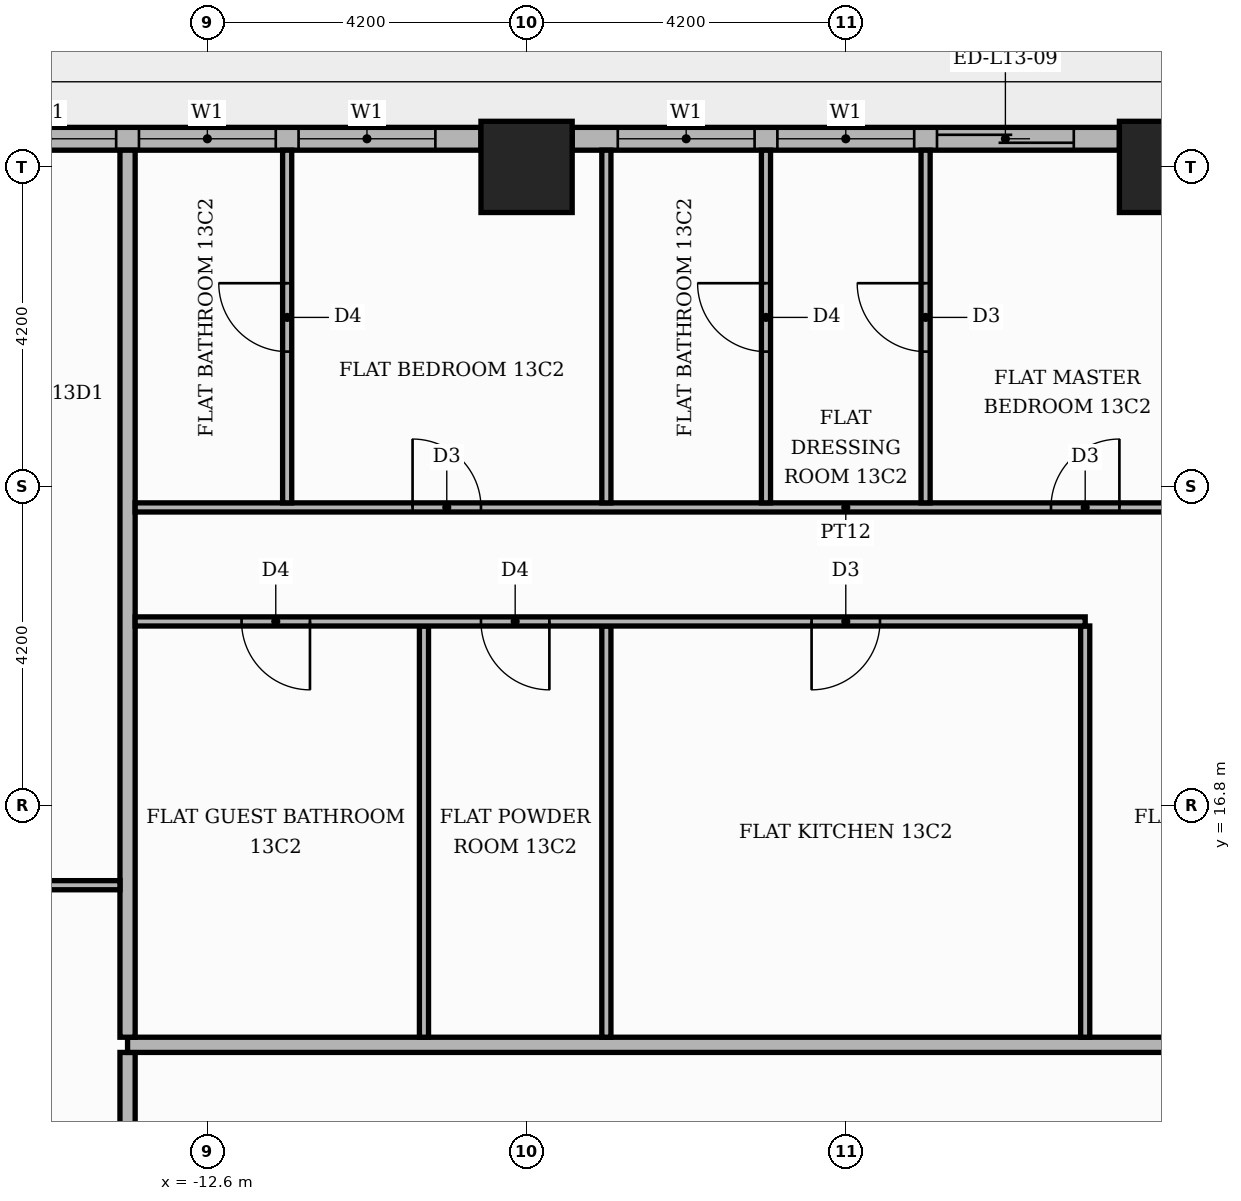
"""IFC4 building model, lengths in metres.
Left out: names, types, materials, properties, quantities, classifications, styles, units other than length and angle.
Written with IfcOpenShell. Run it as: python <this file> out.ifc"""

import sys

from ifc_helpers import new_model, si_unit, direction, frame, frame_2d, origin, origin_2d, place, context, subcontext, project, spatial, rectangle, extrude, element, fill, save


model = new_model("IFC4")
c1 = context("Model", 3, precision=1e-05, world=origin(), true_north=direction((0.0, 1.0)))
c2 = subcontext(c1, "Body", "Model", "MODEL_VIEW")
j1 = project(units=[si_unit("LENGTHUNIT", "METRE"), si_unit("PLANEANGLEUNIT", "RADIAN")], contexts=[c1])
p1 = place(None, origin())
s1 = spatial("IfcSite", under=j1, at=p1, CompositionType="ELEMENT")
p2 = place(p1, origin())
s2 = spatial("IfcBuilding", under=s1, at=p2, CompositionType="ELEMENT")
p3 = place(p2, frame((0.0, 0.0, 58.2)))
s3 = spatial("IfcBuildingStorey", under=s2, at=p3, CompositionType="ELEMENT", Elevation=58.2)
for number, where, z_axis, x_axis in (
    (1, (0.0, 25.2, 0.0), (0.0, 0.0, 1.0), (1.0, 0.0, 0.0)),
    (2, (-8.4, 25.2, 0.0), (0.0, 0.0, 1.0), (1.0, 0.0, 0.0)),
):
    element("IfcColumn", number, at=place(p3, frame(where, z_axis=z_axis, x_axis=x_axis)), inside=s3, PredefinedType="COLUMN", context=c2, shape_type="SweptSolid", body=[
        extrude(rectangle(XDim=1.2, YDim=1.2, at=origin_2d()), origin(), (0.0, 0.0, 1.0), 3.9),
    ])
p4 = place(p3, frame((-0.6, 25.57, 0.0), z_axis=(0.0, 0.0, 1.0), x_axis=(-1.0, 0.0, 0.0)))
e3 = element("IfcWall", 3, at=p4, inside=s3, PredefinedType="STANDARD", context=c2, shape_type="SweptSolid", body=[
    extrude(rectangle(XDim=7.2, YDim=0.3, at=frame_2d((3.6, 0.0))), origin(), (0.0, 0.0, 1.0), 3.48),
])
p5 = place(p4, frame((0.6, 0.0, 0.0)))
e4 = element("IfcOpeningElement", 4, at=p5, cuts=e3, PredefinedType="OPENING", context=c2, shape_type="SweptSolid", body=[
    extrude(rectangle(XDim=1.8, YDim=2.4, at=frame_2d((0.9, 1.2))), frame((0.0, 0.16, 0.0), z_axis=(0.0, -1.0, 0.0), x_axis=(1.0, 0.0, 0.0)), (0.0, 0.0, 1.0), 0.32),
])
p6 = place(p4, frame((2.7, 0.0, 0.9)))
e5 = element("IfcOpeningElement", 5, at=p6, cuts=e3, PredefinedType="OPENING", context=c2, shape_type="SweptSolid", body=[
    extrude(rectangle(XDim=1.8, YDim=2.1, at=frame_2d((0.9, 1.05))), frame((0.0, 0.16, 0.0), z_axis=(0.0, -1.0, 0.0), x_axis=(1.0, 0.0, 0.0)), (0.0, 0.0, 1.0), 0.32),
])
p7 = place(p4, frame((4.8, 0.0, 0.9)))
e6 = element("IfcOpeningElement", 6, at=p7, cuts=e3, PredefinedType="OPENING", context=c2, shape_type="SweptSolid", body=[
    extrude(rectangle(XDim=1.8, YDim=2.1, at=frame_2d((0.9, 1.05))), frame((0.0, 0.16, 0.0), z_axis=(0.0, -1.0, 0.0), x_axis=(1.0, 0.0, 0.0)), (0.0, 0.0, 1.0), 0.32),
])
p8 = place(p3, frame((-9.0, 25.57, 0.0), z_axis=(0.0, 0.0, 1.0), x_axis=(-1.0, 0.0, 0.0)))
e7 = element("IfcWall", 7, at=p8, inside=s3, PredefinedType="STANDARD", context=c2, shape_type="SweptSolid", body=[
    extrude(rectangle(XDim=7.2, YDim=0.3, at=frame_2d((3.6, 0.0))), origin(), (0.0, 0.0, 1.0), 3.48),
])
p9 = place(p8, frame((0.6, 0.0, 0.9)))
e8 = element("IfcOpeningElement", 8, at=p9, cuts=e7, PredefinedType="OPENING", context=c2, shape_type="SweptSolid", body=[
    extrude(rectangle(XDim=1.8, YDim=2.1, at=frame_2d((0.9, 1.05))), frame((0.0, 0.16, 0.0), z_axis=(0.0, -1.0, 0.0), x_axis=(1.0, 0.0, 0.0)), (0.0, 0.0, 1.0), 0.32),
])
p10 = place(p8, frame((2.7, 0.0, 0.9)))
e9 = element("IfcOpeningElement", 9, at=p10, cuts=e7, PredefinedType="OPENING", context=c2, shape_type="SweptSolid", body=[
    extrude(rectangle(XDim=1.8, YDim=2.1, at=frame_2d((0.9, 1.05))), frame((0.0, 0.16, 0.0), z_axis=(0.0, -1.0, 0.0), x_axis=(1.0, 0.0, 0.0)), (0.0, 0.0, 1.0), 0.32),
])
p11 = place(p8, frame((4.8, 0.0, 0.9)))
e10 = element("IfcOpeningElement", 10, at=p11, cuts=e7, PredefinedType="OPENING", context=c2, shape_type="SweptSolid", body=[
    extrude(rectangle(XDim=1.8, YDim=2.1, at=frame_2d((0.9, 1.05))), frame((0.0, 0.16, 0.0), z_axis=(0.0, -1.0, 0.0), x_axis=(1.0, 0.0, 0.0)), (0.0, 0.0, 1.0), 0.32),
])
p12 = place(p3, frame((-13.65, 5.35, 0.0), z_axis=(0.0, 0.0, 1.0), x_axis=(0.0, 1.0, 0.0)))
e11 = element("IfcWall", 11, at=p12, inside=s3, PredefinedType="PARTITIONING", context=c2, shape_type="SweptSolid", body=[
    extrude(rectangle(XDim=8.2, YDim=0.2, at=frame_2d((4.1, 0.0))), origin(), (0.0, 0.0, 1.0), 3.48),
])
p13 = place(p12, frame((5.65, 0.0, 0.0)))
e12 = element("IfcOpeningElement", 12, at=p13, cuts=e11, PredefinedType="OPENING", context=c2, shape_type="SweptSolid", body=[
    extrude(rectangle(XDim=1.1, YDim=2.4, at=frame_2d((0.55, 1.2))), frame((0.0, 0.11, 0.0), z_axis=(0.0, -1.0, 0.0), x_axis=(1.0, 0.0, 0.0)), (0.0, 0.0, 1.0), 0.22),
])
p14 = place(p3, frame((-13.65, 13.65, 0.0), z_axis=(0.0, 0.0, 1.0), x_axis=(1.0, 0.0, 0.0)))
e13 = element("IfcWall", 13, at=p14, inside=s3, PredefinedType="PARTITIONING", context=c2, shape_type="SweptSolid", body=[
    extrude(rectangle(XDim=39.07, YDim=0.2, at=frame_2d((19.535, 0.0))), origin(), (0.0, 0.0, 1.0), 3.48),
])
p15 = place(p14, frame((24.65, 0.0, 0.0)))
e14 = element("IfcOpeningElement", 14, at=p15, cuts=e13, PredefinedType="OPENING", context=c2, shape_type="SweptSolid", body=[
    extrude(rectangle(XDim=1.1, YDim=2.4, at=frame_2d((0.55, 1.2))), frame((0.0, 0.11, 0.0), z_axis=(0.0, -1.0, 0.0), x_axis=(1.0, 0.0, 0.0)), (0.0, 0.0, 1.0), 0.22),
])
p16 = place(p14, frame((14.15, 0.0, 0.0)))
e15 = element("IfcOpeningElement", 15, at=p16, cuts=e13, PredefinedType="OPENING", context=c2, shape_type="SweptSolid", body=[
    extrude(rectangle(XDim=1.1, YDim=2.4, at=frame_2d((0.55, 1.2))), frame((0.0, 0.11, 0.0), z_axis=(0.0, -1.0, 0.0), x_axis=(1.0, 0.0, 0.0)), (0.0, 0.0, 1.0), 0.22),
])
p17 = place(p3, frame((-13.65, 13.75, 0.0), z_axis=(0.0, 0.0, 1.0), x_axis=(0.0, 1.0, 0.0)))
e16 = element("IfcWall", 16, at=p17, inside=s3, PredefinedType="PARTITIONING", context=c2, shape_type="SweptSolid", body=[
    extrude(rectangle(XDim=11.67, YDim=0.2, at=frame_2d((5.835, 0.0))), origin(), (0.0, 0.0, 1.0), 3.48),
])
for number, where, z_axis, x_axis in (
    (17, (-9.75, 13.75, 0.0), (0.0, 0.0, 1.0), (0.0, 1.0, 0.0)),
    (18, (-7.35, 13.75, 0.0), (0.0, 0.0, 1.0), (0.0, 1.0, 0.0)),
    (19, (-1.05, 13.75, 0.0), (0.0, 0.0, 1.0), (0.0, 1.0, 0.0)),
):
    element("IfcWall", number, at=place(p3, frame(where, z_axis=z_axis, x_axis=x_axis)), inside=s3, PredefinedType="PARTITIONING", context=c2, shape_type="SweptSolid", body=[
        extrude(rectangle(XDim=5.41, YDim=0.12, at=frame_2d((2.705, 0.0))), origin(), (0.0, 0.0, 1.0), 3.48),
    ])
p18 = place(p3, frame((-20.12, 15.75, 0.0), z_axis=(0.0, 0.0, 1.0), x_axis=(1.0, 0.0, 0.0)))
e20 = element("IfcWall", 20, at=p18, inside=s3, PredefinedType="PARTITIONING", context=c2, shape_type="SweptSolid", body=[
    extrude(rectangle(XDim=6.37, YDim=0.12, at=frame_2d((3.185, 0.0))), origin(), (0.0, 0.0, 1.0), 3.48),
])
p19 = place(p18, frame((2.735, 0.0, 0.0)))
e21 = element("IfcOpeningElement", 21, at=p19, cuts=e20, PredefinedType="OPENING", context=c2, shape_type="SweptSolid", body=[
    extrude(rectangle(XDim=1.0, YDim=2.1, at=frame_2d((0.5, 1.05))), frame((0.0, 0.07, 0.0), z_axis=(0.0, -1.0, 0.0), x_axis=(1.0, 0.0, 0.0)), (0.0, 0.0, 1.0), 0.14),
])
p20 = place(p3, frame((-13.55, 19.22, 0.0), z_axis=(0.0, 0.0, 1.0), x_axis=(1.0, 0.0, 0.0)))
e22 = element("IfcWall", 22, at=p20, inside=s3, PredefinedType="PARTITIONING", context=c2, shape_type="SweptSolid", body=[
    extrude(rectangle(XDim=12.5, YDim=0.12, at=frame_2d((6.25, 0.0))), origin(), (0.0, 0.0, 1.0), 3.48),
])
p21 = place(p20, frame((8.9, 0.0, 0.0)))
e23 = element("IfcOpeningElement", 23, at=p21, cuts=e22, PredefinedType="OPENING", context=c2, shape_type="SweptSolid", body=[
    extrude(rectangle(XDim=0.9, YDim=2.1, at=frame_2d((0.45, 1.05))), frame((0.0, 0.07, 0.0), z_axis=(0.0, -1.0, 0.0), x_axis=(1.0, 0.0, 0.0)), (0.0, 0.0, 1.0), 0.14),
])
p22 = place(p20, frame((4.55, 0.0, 0.0)))
e24 = element("IfcOpeningElement", 24, at=p22, cuts=e22, PredefinedType="OPENING", context=c2, shape_type="SweptSolid", body=[
    extrude(rectangle(XDim=0.9, YDim=2.1, at=frame_2d((0.45, 1.05))), frame((0.0, 0.07, 0.0), z_axis=(0.0, -1.0, 0.0), x_axis=(1.0, 0.0, 0.0)), (0.0, 0.0, 1.0), 0.14),
])
p23 = place(p20, frame((1.4, 0.0, 0.0)))
e25 = element("IfcOpeningElement", 25, at=p23, cuts=e22, PredefinedType="OPENING", context=c2, shape_type="SweptSolid", body=[
    extrude(rectangle(XDim=0.9, YDim=2.1, at=frame_2d((0.45, 1.05))), frame((0.0, 0.07, 0.0), z_axis=(0.0, -1.0, 0.0), x_axis=(1.0, 0.0, 0.0)), (0.0, 0.0, 1.0), 0.14),
])
p24 = place(p3, frame((-13.55, 20.72, 0.0), z_axis=(0.0, 0.0, 1.0), x_axis=(1.0, 0.0, 0.0)))
e26 = element("IfcWall", 26, at=p24, inside=s3, PredefinedType="PARTITIONING", context=c2, shape_type="SweptSolid", body=[
    extrude(rectangle(XDim=18.7, YDim=0.12, at=frame_2d((9.35, 0.0))), origin(), (0.0, 0.0, 1.0), 3.48),
])
p25 = place(p24, frame((16.2, 0.0, 0.0)))
e27 = element("IfcOpeningElement", 27, at=p25, cuts=e26, PredefinedType="OPENING", context=c2, shape_type="SweptSolid", body=[
    extrude(rectangle(XDim=1.0, YDim=2.1, at=frame_2d((0.5, 1.05))), frame((0.0, 0.07, 0.0), z_axis=(0.0, -1.0, 0.0), x_axis=(1.0, 0.0, 0.0)), (0.0, 0.0, 1.0), 0.14),
])
p26 = place(p24, frame((12.05, 0.0, 0.0)))
e28 = element("IfcOpeningElement", 28, at=p26, cuts=e26, PredefinedType="OPENING", context=c2, shape_type="SweptSolid", body=[
    extrude(rectangle(XDim=0.9, YDim=2.1, at=frame_2d((0.45, 1.05))), frame((0.0, 0.07, 0.0), z_axis=(0.0, -1.0, 0.0), x_axis=(1.0, 0.0, 0.0)), (0.0, 0.0, 1.0), 0.14),
])
p27 = place(p24, frame((3.65, 0.0, 0.0)))
e29 = element("IfcOpeningElement", 29, at=p27, cuts=e26, PredefinedType="OPENING", context=c2, shape_type="SweptSolid", body=[
    extrude(rectangle(XDim=0.9, YDim=2.1, at=frame_2d((0.45, 1.05))), frame((0.0, 0.07, 0.0), z_axis=(0.0, -1.0, 0.0), x_axis=(1.0, 0.0, 0.0)), (0.0, 0.0, 1.0), 0.14),
])
p28 = place(p3, frame((-11.55, 20.78, 0.0), z_axis=(0.0, 0.0, 1.0), x_axis=(0.0, 1.0, 0.0)))
e30 = element("IfcWall", 30, at=p28, inside=s3, PredefinedType="PARTITIONING", context=c2, shape_type="SweptSolid", body=[
    extrude(rectangle(XDim=4.64, YDim=0.12, at=frame_2d((2.32, 0.0))), origin(), (0.0, 0.0, 1.0), 3.48),
])
p29 = place(p28, frame((1.99, 0.0, 0.0)))
e31 = element("IfcOpeningElement", 31, at=p29, cuts=e30, PredefinedType="OPENING", context=c2, shape_type="SweptSolid", body=[
    extrude(rectangle(XDim=0.9, YDim=2.1, at=frame_2d((0.45, 1.05))), frame((0.0, 0.07, 0.0), z_axis=(0.0, -1.0, 0.0), x_axis=(1.0, 0.0, 0.0)), (0.0, 0.0, 1.0), 0.14),
])
p30 = place(p3, frame((-7.35, 20.78, 0.0), z_axis=(0.0, 0.0, 1.0), x_axis=(0.0, 1.0, 0.0)))
e32 = element("IfcWall", 32, at=p30, inside=s3, PredefinedType="PARTITIONING", context=c2, shape_type="SweptSolid", body=[
    extrude(rectangle(XDim=4.64, YDim=0.12, at=frame_2d((2.32, 0.0))), origin(), (0.0, 0.0, 1.0), 3.48),
])
p31 = place(p3, frame((-5.25, 20.78, 0.0), z_axis=(0.0, 0.0, 1.0), x_axis=(0.0, 1.0, 0.0)))
e33 = element("IfcWall", 33, at=p31, inside=s3, PredefinedType="PARTITIONING", context=c2, shape_type="SweptSolid", body=[
    extrude(rectangle(XDim=4.64, YDim=0.12, at=frame_2d((2.32, 0.0))), origin(), (0.0, 0.0, 1.0), 3.48),
])
p32 = place(p31, frame((1.99, 0.0, 0.0)))
e34 = element("IfcOpeningElement", 34, at=p32, cuts=e33, PredefinedType="OPENING", context=c2, shape_type="SweptSolid", body=[
    extrude(rectangle(XDim=0.9, YDim=2.1, at=frame_2d((0.45, 1.05))), frame((0.0, 0.07, 0.0), z_axis=(0.0, -1.0, 0.0), x_axis=(1.0, 0.0, 0.0)), (0.0, 0.0, 1.0), 0.14),
])
p33 = place(p3, frame((-3.15, 20.78, 0.0), z_axis=(0.0, 0.0, 1.0), x_axis=(0.0, 1.0, 0.0)))
e35 = element("IfcWall", 35, at=p33, inside=s3, PredefinedType="PARTITIONING", context=c2, shape_type="SweptSolid", body=[
    extrude(rectangle(XDim=4.64, YDim=0.12, at=frame_2d((2.32, 0.0))), origin(), (0.0, 0.0, 1.0), 3.48),
])
p34 = place(p33, frame((1.99, 0.0, 0.0)))
e36 = element("IfcOpeningElement", 36, at=p34, cuts=e35, PredefinedType="OPENING", context=c2, shape_type="SweptSolid", body=[
    extrude(rectangle(XDim=0.9, YDim=2.1, at=frame_2d((0.45, 1.05))), frame((0.0, 0.07, 0.0), z_axis=(0.0, -1.0, 0.0), x_axis=(1.0, 0.0, 0.0)), (0.0, 0.0, 1.0), 0.14),
])
p35 = place(p5, origin())
e37 = element("IfcDoor", 37, at=p35, inside=s3, OperationType="SLIDING_TO_LEFT", PredefinedType="DOOR", context=c2, shape_type="SweptSolid", body=[
    extrude(rectangle(XDim=1.8, YDim=2.4, at=frame_2d((0.9, 1.2))), frame((0.0, 0.025, 0.0), z_axis=(0.0, -1.0, 0.0), x_axis=(1.0, 0.0, 0.0)), (0.0, 0.0, 1.0), 0.05),
])
fill(e4, e37)
p36 = place(p6, origin())
e38 = element("IfcWindow", 38, at=p36, inside=s3, PartitioningType="SINGLE_PANEL", PredefinedType="WINDOW", context=c2, shape_type="SweptSolid", body=[
    extrude(rectangle(XDim=1.8, YDim=2.1, at=frame_2d((0.9, 1.05))), frame((0.0, 0.03, 0.0), z_axis=(0.0, -1.0, 0.0), x_axis=(1.0, 0.0, 0.0)), (0.0, 0.0, 1.0), 0.06),
])
fill(e5, e38)
p37 = place(p7, origin())
e39 = element("IfcWindow", 39, at=p37, inside=s3, PartitioningType="SINGLE_PANEL", PredefinedType="WINDOW", context=c2, shape_type="SweptSolid", body=[
    extrude(rectangle(XDim=1.8, YDim=2.1, at=frame_2d((0.9, 1.05))), frame((0.0, 0.03, 0.0), z_axis=(0.0, -1.0, 0.0), x_axis=(1.0, 0.0, 0.0)), (0.0, 0.0, 1.0), 0.06),
])
fill(e6, e39)
p38 = place(p9, origin())
e40 = element("IfcWindow", 40, at=p38, inside=s3, PartitioningType="SINGLE_PANEL", PredefinedType="WINDOW", context=c2, shape_type="SweptSolid", body=[
    extrude(rectangle(XDim=1.8, YDim=2.1, at=frame_2d((0.9, 1.05))), frame((0.0, 0.03, 0.0), z_axis=(0.0, -1.0, 0.0), x_axis=(1.0, 0.0, 0.0)), (0.0, 0.0, 1.0), 0.06),
])
fill(e8, e40)
p39 = place(p10, origin())
e41 = element("IfcWindow", 41, at=p39, inside=s3, PartitioningType="SINGLE_PANEL", PredefinedType="WINDOW", context=c2, shape_type="SweptSolid", body=[
    extrude(rectangle(XDim=1.8, YDim=2.1, at=frame_2d((0.9, 1.05))), frame((0.0, 0.03, 0.0), z_axis=(0.0, -1.0, 0.0), x_axis=(1.0, 0.0, 0.0)), (0.0, 0.0, 1.0), 0.06),
])
fill(e9, e41)
p40 = place(p11, origin())
e42 = element("IfcWindow", 42, at=p40, inside=s3, PartitioningType="SINGLE_PANEL", PredefinedType="WINDOW", context=c2, shape_type="SweptSolid", body=[
    extrude(rectangle(XDim=1.8, YDim=2.1, at=frame_2d((0.9, 1.05))), frame((0.0, 0.03, 0.0), z_axis=(0.0, -1.0, 0.0), x_axis=(1.0, 0.0, 0.0)), (0.0, 0.0, 1.0), 0.06),
])
fill(e10, e42)
p41 = place(p21, frame((0.9, 0.0, 0.0), z_axis=(0.0, 0.0, 1.0), x_axis=(-1.0, 0.0, 0.0)))
e43 = element("IfcDoor", 43, at=p41, inside=s3, OperationType="SINGLE_SWING_LEFT", PredefinedType="DOOR", context=c2, shape_type="SweptSolid", body=[
    extrude(rectangle(XDim=0.9, YDim=2.1, at=frame_2d((0.45, 1.05))), frame((0.0, 0.025, 0.0), z_axis=(0.0, -1.0, 0.0), x_axis=(1.0, 0.0, 0.0)), (0.0, 0.0, 1.0), 0.05),
])
fill(e23, e43)
p42 = place(p22, frame((0.9, 0.0, 0.0), z_axis=(0.0, 0.0, 1.0), x_axis=(-1.0, 0.0, 0.0)))
e44 = element("IfcDoor", 44, at=p42, inside=s3, OperationType="SINGLE_SWING_RIGHT", PredefinedType="DOOR", context=c2, shape_type="SweptSolid", body=[
    extrude(rectangle(XDim=0.9, YDim=2.1, at=frame_2d((0.45, 1.05))), frame((0.0, 0.025, 0.0), z_axis=(0.0, -1.0, 0.0), x_axis=(1.0, 0.0, 0.0)), (0.0, 0.0, 1.0), 0.05),
])
fill(e24, e44)
p43 = place(p23, frame((0.9, 0.0, 0.0), z_axis=(0.0, 0.0, 1.0), x_axis=(-1.0, 0.0, 0.0)))
e45 = element("IfcDoor", 45, at=p43, inside=s3, OperationType="SINGLE_SWING_RIGHT", PredefinedType="DOOR", context=c2, shape_type="SweptSolid", body=[
    extrude(rectangle(XDim=0.9, YDim=2.1, at=frame_2d((0.45, 1.05))), frame((0.0, 0.025, 0.0), z_axis=(0.0, -1.0, 0.0), x_axis=(1.0, 0.0, 0.0)), (0.0, 0.0, 1.0), 0.05),
])
fill(e25, e45)
p44 = place(p26, origin())
e46 = element("IfcDoor", 46, at=p44, inside=s3, OperationType="SINGLE_SWING_RIGHT", PredefinedType="DOOR", context=c2, shape_type="SweptSolid", body=[
    extrude(rectangle(XDim=0.9, YDim=2.1, at=frame_2d((0.45, 1.05))), frame((0.0, 0.025, 0.0), z_axis=(0.0, -1.0, 0.0), x_axis=(1.0, 0.0, 0.0)), (0.0, 0.0, 1.0), 0.05),
])
fill(e28, e46)
p45 = place(p34, origin())
e47 = element("IfcDoor", 47, at=p45, inside=s3, OperationType="SINGLE_SWING_RIGHT", PredefinedType="DOOR", context=c2, shape_type="SweptSolid", body=[
    extrude(rectangle(XDim=0.9, YDim=2.1, at=frame_2d((0.45, 1.05))), frame((0.0, 0.025, 0.0), z_axis=(0.0, -1.0, 0.0), x_axis=(1.0, 0.0, 0.0)), (0.0, 0.0, 1.0), 0.05),
])
fill(e36, e47)
p46 = place(p32, origin())
e48 = element("IfcDoor", 48, at=p46, inside=s3, OperationType="SINGLE_SWING_RIGHT", PredefinedType="DOOR", context=c2, shape_type="SweptSolid", body=[
    extrude(rectangle(XDim=0.9, YDim=2.1, at=frame_2d((0.45, 1.05))), frame((0.0, 0.025, 0.0), z_axis=(0.0, -1.0, 0.0), x_axis=(1.0, 0.0, 0.0)), (0.0, 0.0, 1.0), 0.05),
])
fill(e34, e48)
p47 = place(p27, origin())
e49 = element("IfcDoor", 49, at=p47, inside=s3, OperationType="SINGLE_SWING_LEFT", PredefinedType="DOOR", context=c2, shape_type="SweptSolid", body=[
    extrude(rectangle(XDim=0.9, YDim=2.1, at=frame_2d((0.45, 1.05))), frame((0.0, 0.025, 0.0), z_axis=(0.0, -1.0, 0.0), x_axis=(1.0, 0.0, 0.0)), (0.0, 0.0, 1.0), 0.05),
])
fill(e29, e49)
p48 = place(p29, origin())
e50 = element("IfcDoor", 50, at=p48, inside=s3, OperationType="SINGLE_SWING_RIGHT", PredefinedType="DOOR", context=c2, shape_type="SweptSolid", body=[
    extrude(rectangle(XDim=0.9, YDim=2.1, at=frame_2d((0.45, 1.05))), frame((0.0, 0.025, 0.0), z_axis=(0.0, -1.0, 0.0), x_axis=(1.0, 0.0, 0.0)), (0.0, 0.0, 1.0), 0.05),
])
fill(e31, e50)
save(model, sys.argv[1])
